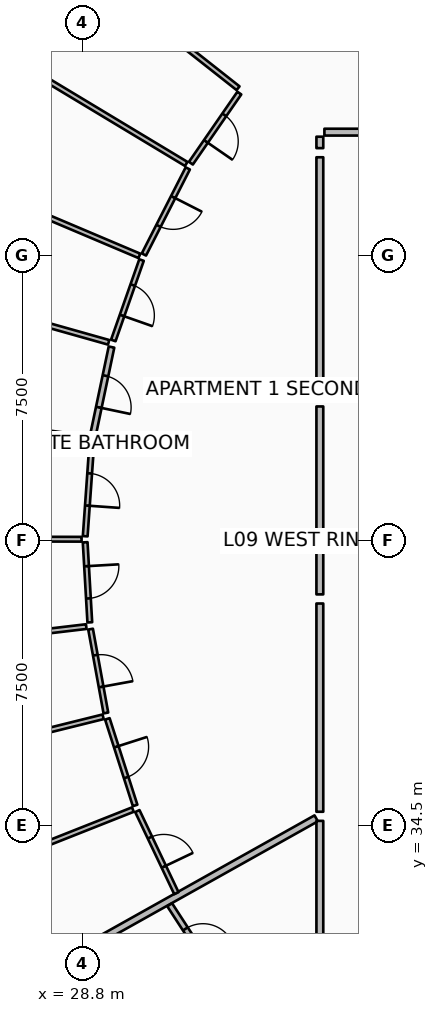
"""IFC4 building model, lengths in metres.
Left out: names, types, materials, properties, quantities, classifications, styles, units other than length and angle.
Written with IfcOpenShell. Run it as: python <this file> out.ifc"""

import sys

from ifc_helpers import new_model, si_unit, direction, frame, frame_2d, origin, place, context, subcontext, project, spatial, rectangle, extrude, element, fill, save


model = new_model("IFC4")
c1 = context("Model", 3, precision=1e-05, world=origin(), true_north=direction((0.0, 1.0)))
c2 = subcontext(c1, "Body", "Model", "MODEL_VIEW")
j1 = project(units=[si_unit("LENGTHUNIT", "METRE"), si_unit("PLANEANGLEUNIT", "RADIAN")], contexts=[c1])
p1 = place(None, origin())
s1 = spatial("IfcSite", under=j1, at=p1, CompositionType="ELEMENT")
p2 = place(p1, origin())
s2 = spatial("IfcBuilding", under=s1, at=p2, CompositionType="ELEMENT")
p3 = place(p2, frame((0.0, 0.0, 41.4)))
s3 = spatial("IfcBuildingStorey", under=s2, at=p3, CompositionType="ELEMENT", Elevation=41.4)
p4 = place(p3, frame((34.954, 34.694, 0.0), z_axis=(0.0, 0.0, 1.0), x_axis=(-0.872493465611, -0.488625779577, 0.0)))
e1 = element("IfcWall", 1, at=p4, inside=s3, PredefinedType="PARTITIONING", context=c2, shape_type="SweptSolid", body=[
    extrude(rectangle(XDim=16.586, YDim=0.18, at=frame_2d((8.293, 0.0))), origin(), (0.0, 0.0, 1.0), 2.867),
])
p5 = place(p3, frame((41.86, 52.75, 0.0), z_axis=(0.0, 0.0, 1.0), x_axis=(-1.0, 0.0, 0.0)))
e2 = element("IfcWall", 2, at=p5, inside=s3, PredefinedType="PARTITIONING", context=c2, shape_type="SweptSolid", body=[
    extrude(rectangle(XDim=6.69, YDim=0.18, at=frame_2d((3.345, 0.0))), origin(), (0.0, 0.0, 1.0), 2.867),
])
p6 = place(p5, frame((2.795, 0.0, 0.0)))
e3 = element("IfcOpeningElement", 3, at=p6, cuts=e2, PredefinedType="OPENING", context=c2, shape_type="SweptSolid", body=[
    extrude(rectangle(XDim=1.1, YDim=2.1, at=frame_2d((0.55, 1.05))), frame((0.0, 0.1, 0.0), z_axis=(0.0, -1.0, 0.0), x_axis=(1.0, 0.0, 0.0)), (0.0, 0.0, 1.0), 0.2),
])
p7 = place(p3, frame((35.05, 52.63, 0.0), z_axis=(0.0, 0.0, 1.0), x_axis=(0.0, -1.0, 0.0)))
e4 = element("IfcWall", 4, at=p7, inside=s3, PredefinedType="PARTITIONING", context=c2, shape_type="SweptSolid", body=[
    extrude(rectangle(XDim=0.301, YDim=0.18, at=frame_2d((0.15, 0.0))), origin(), (0.0, 0.0, 1.0), 2.867),
])
p8 = place(p3, frame((35.05, 52.089, 0.0), z_axis=(0.0, 0.0, 1.0), x_axis=(0.0, -1.0, 0.0)))
e5 = element("IfcWall", 5, at=p8, inside=s3, PredefinedType="PARTITIONING", context=c2, shape_type="SweptSolid", body=[
    extrude(rectangle(XDim=6.317, YDim=0.18, at=frame_2d((3.158, 0.0))), origin(), (0.0, 0.0, 1.0), 2.867),
])
p9 = place(p3, frame((32.898, 53.905, 0.0), z_axis=(0.0, 0.0, 1.0), x_axis=(-0.78532854108, 0.619079221558, 0.0)))
e6 = element("IfcWall", 6, at=p9, inside=s3, PredefinedType="PARTITIONING", context=c2, shape_type="SweptSolid", body=[
    extrude(rectangle(XDim=8.842, YDim=0.125, at=frame_2d((4.421, 0.0))), origin(), (0.0, 0.0, 1.0), 2.867),
])
p10 = place(p3, frame((31.534, 51.913, 0.0), z_axis=(0.0, 0.0, 1.0), x_axis=(-0.856706990958, 0.515803384676, 0.0)))
e7 = element("IfcWall", 7, at=p10, inside=s3, PredefinedType="PARTITIONING", context=c2, shape_type="SweptSolid", body=[
    extrude(rectangle(XDim=9.057, YDim=0.125, at=frame_2d((4.528, 0.0))), origin(), (0.0, 0.0, 1.0), 2.94),
])
p11 = place(p3, frame((30.301, 49.494, 0.0), z_axis=(0.0, 0.0, 1.0), x_axis=(-0.920840746031, 0.389938867579, 0.0)))
e8 = element("IfcWall", 8, at=p11, inside=s3, PredefinedType="PARTITIONING", context=c2, shape_type="SweptSolid", body=[
    extrude(rectangle(XDim=9.966, YDim=0.125, at=frame_2d((4.983, 0.0))), origin(), (0.0, 0.0, 1.0), 2.94),
])
p12 = place(p3, frame((32.931, 53.778, 0.0), z_axis=(0.0, 0.0, 1.0), x_axis=(-0.568541738061, -0.822654418382, 0.0)))
e9 = element("IfcWall", 9, at=p12, inside=s3, PredefinedType="PARTITIONING", context=c2, shape_type="SweptSolid", body=[
    extrude(rectangle(XDim=2.242, YDim=0.125, at=frame_2d((1.121, 0.0))), origin(), (0.0, 0.0, 1.0), 2.867),
])
p13 = place(p12, frame((0.696, 0.0, 0.0)))
e10 = element("IfcOpeningElement", 10, at=p13, cuts=e9, PredefinedType="OPENING", context=c2, shape_type="SweptSolid", body=[
    extrude(rectangle(XDim=0.85, YDim=2.06, at=frame_2d((0.425, 1.03))), frame((0.0, 0.073, 0.0), z_axis=(0.0, -1.0, 0.0), x_axis=(1.0, 0.0, 0.0)), (0.0, 0.0, 1.0), 0.145),
])
p14 = place(p3, frame((31.575, 51.796, 0.0), z_axis=(0.0, 0.0, 1.0), x_axis=(-0.454037986735, -0.890982326762, 0.0)))
e11 = element("IfcWall", 11, at=p14, inside=s3, PredefinedType="PARTITIONING", context=c2, shape_type="SweptSolid", body=[
    extrude(rectangle(XDim=2.542, YDim=0.125, at=frame_2d((1.271, 0.0))), origin(), (0.0, 0.0, 1.0), 2.94),
])
p15 = place(p14, frame((0.846, 0.0, 0.0)))
e12 = element("IfcOpeningElement", 12, at=p15, cuts=e11, PredefinedType="OPENING", context=c2, shape_type="SweptSolid", body=[
    extrude(rectangle(XDim=0.85, YDim=2.06, at=frame_2d((0.425, 1.03))), frame((0.0, 0.073, 0.0), z_axis=(0.0, -1.0, 0.0), x_axis=(1.0, 0.0, 0.0)), (0.0, 0.0, 1.0), 0.145),
])
p16 = place(p3, frame((30.358, 49.384, 0.0), z_axis=(0.0, 0.0, 1.0), x_axis=(-0.331344536708, -0.943509829304, 0.0)))
e13 = element("IfcWall", 13, at=p16, inside=s3, PredefinedType="PARTITIONING", context=c2, shape_type="SweptSolid", body=[
    extrude(rectangle(XDim=2.242, YDim=0.125, at=frame_2d((1.121, 0.0))), origin(), (0.0, 0.0, 1.0), 2.867),
])
p17 = place(p16, frame((0.696, 0.0, 0.0)))
e14 = element("IfcOpeningElement", 14, at=p17, cuts=e13, PredefinedType="OPENING", context=c2, shape_type="SweptSolid", body=[
    extrude(rectangle(XDim=0.85, YDim=2.06, at=frame_2d((0.425, 1.03))), frame((0.0, 0.073, 0.0), z_axis=(0.0, -1.0, 0.0), x_axis=(1.0, 0.0, 0.0)), (0.0, 0.0, 1.0), 0.145),
])
p18 = place(p3, frame((35.05, 45.532, 0.0), z_axis=(0.0, 0.0, 1.0), x_axis=(0.0, -1.0, 0.0)))
e15 = element("IfcWall", 15, at=p18, inside=s3, PredefinedType="PARTITIONING", context=c2, shape_type="SweptSolid", body=[
    extrude(rectangle(XDim=4.945, YDim=0.18, at=frame_2d((2.472, 0.0))), origin(), (0.0, 0.0, 1.0), 2.867),
])
p19 = place(p3, frame((29.492, 47.22, 0.0), z_axis=(0.0, 0.0, 1.0), x_axis=(-0.962454721813, 0.271442274635, 0.0)))
e16 = element("IfcWall", 16, at=p19, inside=s3, PredefinedType="PARTITIONING", context=c2, shape_type="SweptSolid", body=[
    extrude(rectangle(XDim=11.344, YDim=0.125, at=frame_2d((5.672, 0.0))), origin(), (0.0, 0.0, 1.0), 2.867),
])
p20 = place(p3, frame((29.568, 47.095, 0.0), z_axis=(0.0, 0.0, 1.0), x_axis=(-0.205861309483, -0.978581177654, 0.0)))
e17 = element("IfcWall", 17, at=p20, inside=s3, PredefinedType="PARTITIONING", context=c2, shape_type="SweptSolid", body=[
    extrude(rectangle(XDim=2.392, YDim=0.15, at=frame_2d((1.196, 0.0))), origin(), (0.0, 0.0, 1.0), 2.867),
])
p21 = place(p20, frame((0.771, 0.0, 0.0)))
e18 = element("IfcOpeningElement", 18, at=p21, cuts=e17, PredefinedType="OPENING", context=c2, shape_type="SweptSolid", body=[
    extrude(rectangle(XDim=0.85, YDim=2.06, at=frame_2d((0.425, 1.03))), frame((0.0, 0.085, 0.0), z_axis=(0.0, -1.0, 0.0), x_axis=(1.0, 0.0, 0.0)), (0.0, 0.0, 1.0), 0.17),
])
p22 = place(p3, frame((28.968, 44.678, 0.0), z_axis=(0.0, 0.0, 1.0), x_axis=(-0.990240767804, 0.139367219172, 0.0)))
e19 = element("IfcWall", 19, at=p22, inside=s3, PredefinedType="PARTITIONING", context=c2, shape_type="SweptSolid", body=[
    extrude(rectangle(XDim=4.46, YDim=0.15, at=frame_2d((2.23, 0.0))), origin(), (0.0, 0.0, 1.0), 2.94),
])
p23 = place(p3, frame((28.78, 42.038, 0.0), z_axis=(0.0, 0.0, 1.0), x_axis=(-0.999998036955, 0.001981435282, 0.0)))
e20 = element("IfcWall", 20, at=p23, inside=s3, PredefinedType="PARTITIONING", context=c2, shape_type="SweptSolid", body=[
    extrude(rectangle(XDim=12.075, YDim=0.125, at=frame_2d((6.038, 0.0))), origin(), (0.0, 0.0, 1.0), 2.94),
])
p24 = place(p3, frame((29.05, 44.576, 0.0), z_axis=(0.0, 0.0, 1.0), x_axis=(-0.070831673661, -0.997488282641, 0.0)))
e21 = element("IfcWall", 21, at=p24, inside=s3, PredefinedType="PARTITIONING", context=c2, shape_type="SweptSolid", body=[
    extrude(rectangle(XDim=2.464, YDim=0.125, at=frame_2d((1.232, 0.0))), origin(), (0.0, 0.0, 1.0), 2.94),
])
p25 = place(p24, frame((0.807, 0.0, 0.0)))
e22 = element("IfcOpeningElement", 22, at=p25, cuts=e21, PredefinedType="OPENING", context=c2, shape_type="SweptSolid", body=[
    extrude(rectangle(XDim=0.85, YDim=2.06, at=frame_2d((0.425, 1.03))), frame((0.0, 0.073, 0.0), z_axis=(0.0, -1.0, 0.0), x_axis=(1.0, 0.0, 0.0)), (0.0, 0.0, 1.0), 0.145),
])
p26 = place(p3, frame((28.875, 41.958, 0.0), z_axis=(0.0, 0.0, 1.0), x_axis=(0.057962417622, -0.998318765797, 0.0)))
e23 = element("IfcWall", 23, at=p26, inside=s3, PredefinedType="PARTITIONING", context=c2, shape_type="SweptSolid", body=[
    extrude(rectangle(XDim=2.11, YDim=0.125, at=frame_2d((1.055, 0.0))), origin(), (0.0, 0.0, 1.0), 2.867),
])
p27 = place(p26, frame((0.63, 0.0, 0.0)))
e24 = element("IfcOpeningElement", 24, at=p27, cuts=e23, PredefinedType="OPENING", context=c2, shape_type="SweptSolid", body=[
    extrude(rectangle(XDim=0.85, YDim=2.06, at=frame_2d((0.425, 1.03))), frame((0.0, 0.073, 0.0), z_axis=(0.0, -1.0, 0.0), x_axis=(1.0, 0.0, 0.0)), (0.0, 0.0, 1.0), 0.145),
])
p28 = place(p3, frame((35.05, 40.347, 0.0), z_axis=(0.0, 0.0, 1.0), x_axis=(0.0, -1.0, 0.0)))
e25 = element("IfcWall", 25, at=p28, inside=s3, PredefinedType="PARTITIONING", context=c2, shape_type="SweptSolid", body=[
    extrude(rectangle(XDim=5.48, YDim=0.18, at=frame_2d((2.74, 0.0))), origin(), (0.0, 0.0, 1.0), 2.867),
])
p29 = place(p3, frame((28.903, 39.74, 0.0), z_axis=(0.0, 0.0, 1.0), x_axis=(-0.993068040113, -0.117540919282, 0.0)))
e26 = element("IfcWall", 26, at=p29, inside=s3, PredefinedType="PARTITIONING", context=c2, shape_type="SweptSolid", body=[
    extrude(rectangle(XDim=12.309, YDim=0.125, at=frame_2d((6.154, 0.0))), origin(), (0.0, 0.0, 1.0), 2.867),
])
p30 = place(p3, frame((29.347, 37.366, 0.0), z_axis=(0.0, 0.0, 1.0), x_axis=(-0.970510462135, -0.241059002917, 0.0)))
e27 = element("IfcWall", 27, at=p30, inside=s3, PredefinedType="PARTITIONING", context=c2, shape_type="SweptSolid", body=[
    extrude(rectangle(XDim=11.79, YDim=0.125, at=frame_2d((5.895, 0.0))), origin(), (0.0, 0.0, 1.0), 2.94),
])
p31 = place(p3, frame((30.13, 34.925, 0.0), z_axis=(0.0, 0.0, 1.0), x_axis=(-0.929770978957, -0.368138461302, 0.0)))
e28 = element("IfcWall", 28, at=p31, inside=s3, PredefinedType="PARTITIONING", context=c2, shape_type="SweptSolid", body=[
    extrude(rectangle(XDim=11.773, YDim=0.125, at=frame_2d((5.887, 0.0))), origin(), (0.0, 0.0, 1.0), 2.94),
])
p32 = place(p3, frame((29.017, 39.673, 0.0), z_axis=(0.0, 0.0, 1.0), x_axis=(0.179632658462, -0.983733758704, 0.0)))
e29 = element("IfcWall", 29, at=p32, inside=s3, PredefinedType="PARTITIONING", context=c2, shape_type="SweptSolid", body=[
    extrude(rectangle(XDim=2.242, YDim=0.125, at=frame_2d((1.121, 0.0))), origin(), (0.0, 0.0, 1.0), 2.867),
])
p33 = place(p32, frame((0.696, 0.0, 0.0)))
e30 = element("IfcOpeningElement", 30, at=p33, cuts=e29, PredefinedType="OPENING", context=c2, shape_type="SweptSolid", body=[
    extrude(rectangle(XDim=0.85, YDim=2.06, at=frame_2d((0.425, 1.03))), frame((0.0, 0.073, 0.0), z_axis=(0.0, -1.0, 0.0), x_axis=(1.0, 0.0, 0.0)), (0.0, 0.0, 1.0), 0.145),
])
p34 = place(p3, frame((29.458, 37.312, 0.0), z_axis=(0.0, 0.0, 1.0), x_axis=(0.305338513131, -0.952243872335, 0.0)))
e31 = element("IfcWall", 31, at=p34, inside=s3, PredefinedType="PARTITIONING", context=c2, shape_type="SweptSolid", body=[
    extrude(rectangle(XDim=2.392, YDim=0.125, at=frame_2d((1.196, 0.0))), origin(), (0.0, 0.0, 1.0), 2.94),
])
p35 = place(p34, frame((0.771, 0.0, 0.0)))
e32 = element("IfcOpeningElement", 32, at=p35, cuts=e31, PredefinedType="OPENING", context=c2, shape_type="SweptSolid", body=[
    extrude(rectangle(XDim=0.85, YDim=2.06, at=frame_2d((0.425, 1.03))), frame((0.0, 0.073, 0.0), z_axis=(0.0, -1.0, 0.0), x_axis=(1.0, 0.0, 0.0)), (0.0, 0.0, 1.0), 0.145),
])
p36 = place(p3, frame((30.248, 34.885, 0.0), z_axis=(0.0, 0.0, 1.0), x_axis=(0.429366977128, -0.903130111862, 0.0)))
e33 = element("IfcWall", 33, at=p36, inside=s3, PredefinedType="PARTITIONING", context=c2, shape_type="SweptSolid", body=[
    extrude(rectangle(XDim=2.392, YDim=0.125, at=frame_2d((1.196, 0.0))), origin(), (0.0, 0.0, 1.0), 2.867),
])
p37 = place(p36, frame((0.771, 0.0, 0.0)))
e34 = element("IfcOpeningElement", 34, at=p37, cuts=e33, PredefinedType="OPENING", context=c2, shape_type="SweptSolid", body=[
    extrude(rectangle(XDim=0.85, YDim=2.06, at=frame_2d((0.425, 1.03))), frame((0.0, 0.073, 0.0), z_axis=(0.0, -1.0, 0.0), x_axis=(1.0, 0.0, 0.0)), (0.0, 0.0, 1.0), 0.145),
])
p38 = place(p3, frame((35.05, 34.628, 0.0), z_axis=(0.0, 0.0, 1.0), x_axis=(0.0, -1.0, 0.0)))
e35 = element("IfcWall", 35, at=p38, inside=s3, PredefinedType="PARTITIONING", context=c2, shape_type="SweptSolid", body=[
    extrude(rectangle(XDim=3.258, YDim=0.18, at=frame_2d((1.629, 0.0))), origin(), (0.0, 0.0, 1.0), 2.867),
])
p39 = place(p3, frame((31.098, 32.42, 0.0), z_axis=(0.0, 0.0, 1.0), x_axis=(0.544893998924, -0.838504937336, 0.0)))
e36 = element("IfcWall", 36, at=p39, inside=s3, PredefinedType="PARTITIONING", context=c2, shape_type="SweptSolid", body=[
    extrude(rectangle(XDim=2.365, YDim=0.15, at=frame_2d((1.182, 0.0))), origin(), (0.0, 0.0, 1.0), 2.867),
])
p40 = place(p39, frame((0.757, 0.0, 0.0)))
e37 = element("IfcOpeningElement", 37, at=p40, cuts=e36, PredefinedType="OPENING", context=c2, shape_type="SweptSolid", body=[
    extrude(rectangle(XDim=0.85, YDim=2.06, at=frame_2d((0.425, 1.03))), frame((0.0, 0.085, 0.0), z_axis=(0.0, -1.0, 0.0), x_axis=(1.0, 0.0, 0.0)), (0.0, 0.0, 1.0), 0.17),
])
p41 = place(p13, origin())
e38 = element("IfcDoor", 38, at=p41, inside=s3, OperationType="SINGLE_SWING_RIGHT", PredefinedType="DOOR", context=c2, shape_type="SweptSolid", body=[
    extrude(rectangle(XDim=0.85, YDim=2.06, at=frame_2d((0.425, 1.03))), frame((0.0, 0.025, 0.0), z_axis=(0.0, -1.0, 0.0), x_axis=(1.0, 0.0, 0.0)), (0.0, 0.0, 1.0), 0.05),
])
fill(e10, e38)
p42 = place(p15, origin())
e39 = element("IfcDoor", 39, at=p42, inside=s3, OperationType="SINGLE_SWING_LEFT", PredefinedType="DOOR", context=c2, shape_type="SweptSolid", body=[
    extrude(rectangle(XDim=0.85, YDim=2.06, at=frame_2d((0.425, 1.03))), frame((0.0, 0.025, 0.0), z_axis=(0.0, -1.0, 0.0), x_axis=(1.0, 0.0, 0.0)), (0.0, 0.0, 1.0), 0.05),
])
fill(e12, e39)
p43 = place(p17, origin())
e40 = element("IfcDoor", 40, at=p43, inside=s3, OperationType="SINGLE_SWING_RIGHT", PredefinedType="DOOR", context=c2, shape_type="SweptSolid", body=[
    extrude(rectangle(XDim=0.85, YDim=2.06, at=frame_2d((0.425, 1.03))), frame((0.0, 0.025, 0.0), z_axis=(0.0, -1.0, 0.0), x_axis=(1.0, 0.0, 0.0)), (0.0, 0.0, 1.0), 0.05),
])
fill(e14, e40)
p44 = place(p21, origin())
e41 = element("IfcDoor", 41, at=p44, inside=s3, OperationType="SINGLE_SWING_RIGHT", PredefinedType="DOOR", context=c2, shape_type="SweptSolid", body=[
    extrude(rectangle(XDim=0.85, YDim=2.06, at=frame_2d((0.425, 1.03))), frame((0.0, 0.025, 0.0), z_axis=(0.0, -1.0, 0.0), x_axis=(1.0, 0.0, 0.0)), (0.0, 0.0, 1.0), 0.05),
])
fill(e18, e41)
p45 = place(p25, origin())
e42 = element("IfcDoor", 42, at=p45, inside=s3, OperationType="SINGLE_SWING_RIGHT", PredefinedType="DOOR", context=c2, shape_type="SweptSolid", body=[
    extrude(rectangle(XDim=0.85, YDim=2.06, at=frame_2d((0.425, 1.03))), frame((0.0, 0.025, 0.0), z_axis=(0.0, -1.0, 0.0), x_axis=(1.0, 0.0, 0.0)), (0.0, 0.0, 1.0), 0.05),
])
fill(e22, e42)
p46 = place(p27, origin())
e43 = element("IfcDoor", 43, at=p46, inside=s3, OperationType="SINGLE_SWING_LEFT", PredefinedType="DOOR", context=c2, shape_type="SweptSolid", body=[
    extrude(rectangle(XDim=0.85, YDim=2.06, at=frame_2d((0.425, 1.03))), frame((0.0, 0.025, 0.0), z_axis=(0.0, -1.0, 0.0), x_axis=(1.0, 0.0, 0.0)), (0.0, 0.0, 1.0), 0.05),
])
fill(e24, e43)
p47 = place(p33, origin())
e44 = element("IfcDoor", 44, at=p47, inside=s3, OperationType="SINGLE_SWING_RIGHT", PredefinedType="DOOR", context=c2, shape_type="SweptSolid", body=[
    extrude(rectangle(XDim=0.85, YDim=2.06, at=frame_2d((0.425, 1.03))), frame((0.0, 0.025, 0.0), z_axis=(0.0, -1.0, 0.0), x_axis=(1.0, 0.0, 0.0)), (0.0, 0.0, 1.0), 0.05),
])
fill(e30, e44)
p48 = place(p35, origin())
e45 = element("IfcDoor", 45, at=p48, inside=s3, OperationType="SINGLE_SWING_LEFT", PredefinedType="DOOR", context=c2, shape_type="SweptSolid", body=[
    extrude(rectangle(XDim=0.85, YDim=2.06, at=frame_2d((0.425, 1.03))), frame((0.0, 0.025, 0.0), z_axis=(0.0, -1.0, 0.0), x_axis=(1.0, 0.0, 0.0)), (0.0, 0.0, 1.0), 0.05),
])
fill(e32, e45)
p49 = place(p37, origin())
e46 = element("IfcDoor", 46, at=p49, inside=s3, OperationType="SINGLE_SWING_RIGHT", PredefinedType="DOOR", context=c2, shape_type="SweptSolid", body=[
    extrude(rectangle(XDim=0.85, YDim=2.06, at=frame_2d((0.425, 1.03))), frame((0.0, 0.025, 0.0), z_axis=(0.0, -1.0, 0.0), x_axis=(1.0, 0.0, 0.0)), (0.0, 0.0, 1.0), 0.05),
])
fill(e34, e46)
p50 = place(p40, origin())
e47 = element("IfcDoor", 47, at=p50, inside=s3, OperationType="SINGLE_SWING_RIGHT", PredefinedType="DOOR", context=c2, shape_type="SweptSolid", body=[
    extrude(rectangle(XDim=0.85, YDim=2.06, at=frame_2d((0.425, 1.03))), frame((0.0, 0.025, 0.0), z_axis=(0.0, -1.0, 0.0), x_axis=(1.0, 0.0, 0.0)), (0.0, 0.0, 1.0), 0.05),
])
fill(e37, e47)
save(model, sys.argv[1])
